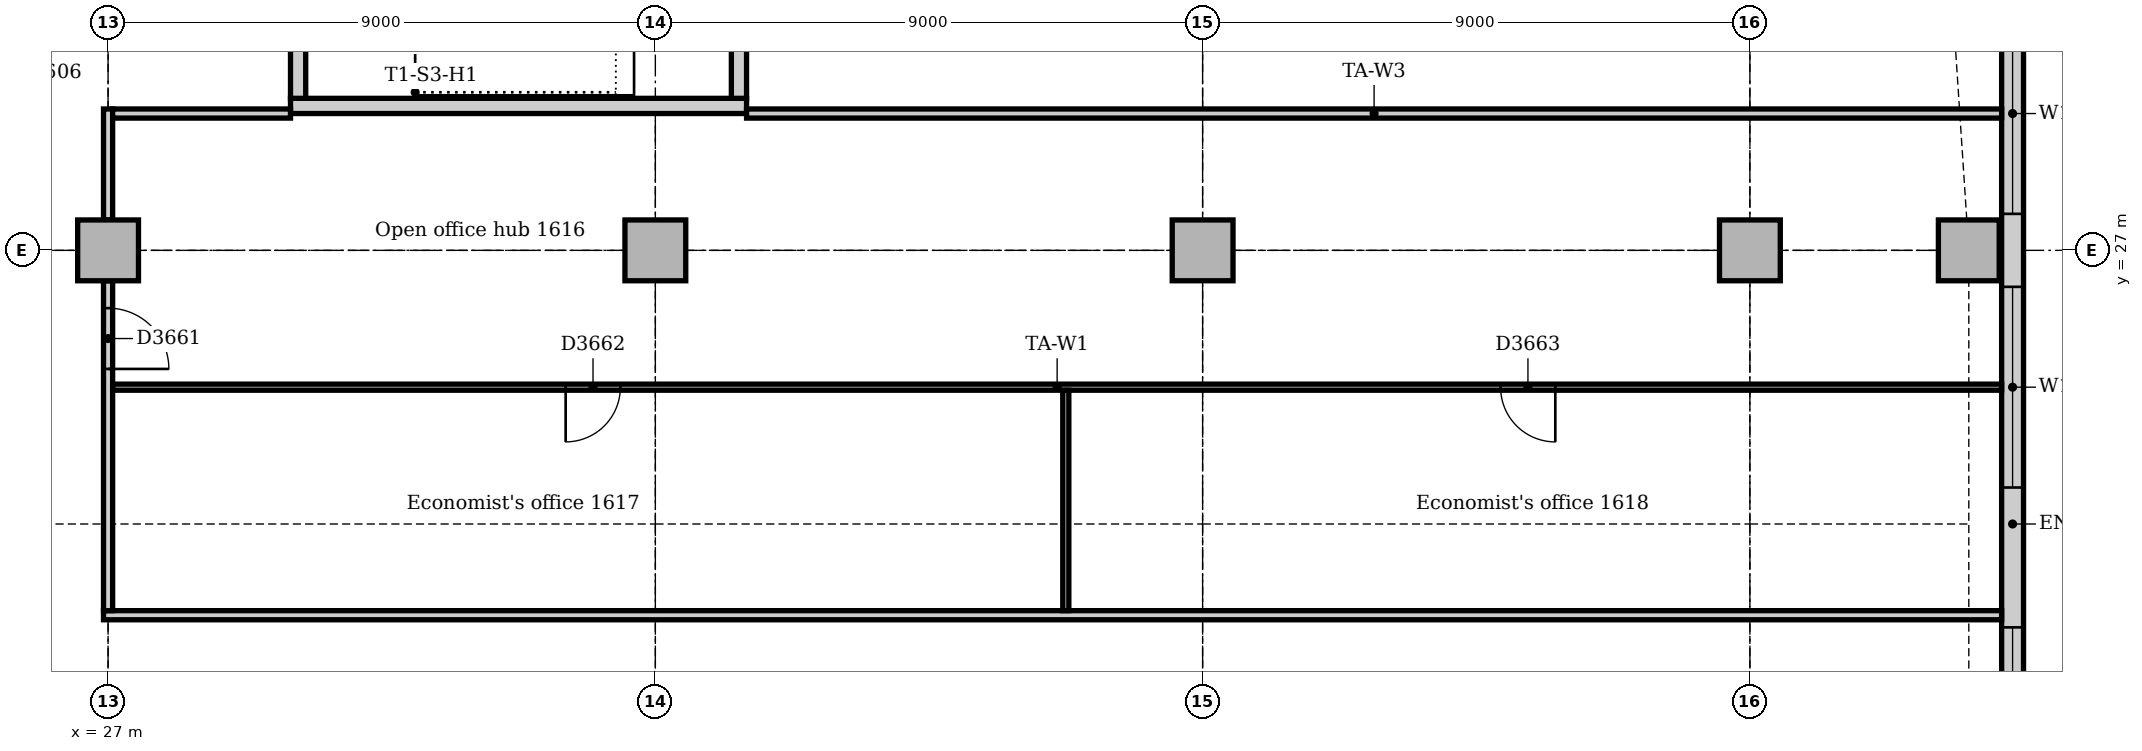
"""IFC4 building model, lengths in metres.
Left out: names, types, materials, properties, quantities, classifications, styles, units other than length and angle.
Written with IfcOpenShell. Run it as: python <this file> out.ifc"""

import sys

from ifc_helpers import new_model, si_unit, direction, frame, frame_2d, origin, origin_2d, place, context, subcontext, project, spatial, rectangle, extrude, element, fill, save


model = new_model("IFC4")
c1 = context("Model", 3, precision=1e-05, world=origin(), true_north=direction((0.0, 1.0)))
c2 = subcontext(c1, "Body", "Model", "MODEL_VIEW")
j1 = project(units=[si_unit("LENGTHUNIT", "METRE"), si_unit("PLANEANGLEUNIT", "RADIAN")], contexts=[c1])
p1 = place(None, origin())
s1 = spatial("IfcSite", under=j1, at=p1, CompositionType="ELEMENT")
p2 = place(p1, origin())
s2 = spatial("IfcBuilding", under=s1, at=p2, CompositionType="ELEMENT")
p3 = place(p2, frame((0.0, 0.0, 71.0)))
s3 = spatial("IfcBuildingStorey", under=s2, at=p3, CompositionType="ELEMENT", Elevation=71.0)
p4 = place(p3, frame((30.0, 29.375, 0.0), z_axis=(0.0, 0.0, 1.0), x_axis=(1.0, 0.0, 0.0)))
e1 = element("IfcWall", 1, at=p4, inside=s3, PredefinedType="SOLIDWALL", context=c2, shape_type="SweptSolid", body=[
    extrude(rectangle(XDim=7.5, YDim=0.25, at=frame_2d((3.75, 0.0))), origin(), (0.0, 0.0, 1.0), 4.0),
])
p5 = place(p3, frame((37.375, 29.5, 0.0), z_axis=(0.0, 0.0, 1.0), x_axis=(0.0, 1.0, 0.0)))
e2 = element("IfcWall", 2, at=p5, inside=s3, PredefinedType="SOLIDWALL", context=c2, shape_type="SweptSolid", body=[
    extrude(rectangle(XDim=4.0, YDim=0.25, at=frame_2d((2.0, 0.0))), origin(), (0.0, 0.0, 1.0), 4.0),
])
p6 = place(p3, frame((30.125, 33.5, 0.0), z_axis=(0.0, 0.0, 1.0), x_axis=(0.0, -1.0, 0.0)))
e3 = element("IfcWall", 3, at=p6, inside=s3, PredefinedType="SOLIDWALL", context=c2, shape_type="SweptSolid", body=[
    extrude(rectangle(XDim=4.0, YDim=0.25, at=frame_2d((2.0, 0.0))), origin(), (0.0, 0.0, 1.0), 4.0),
])
p7 = place(p6, frame((1.5, 0.0, 0.0)))
e4 = element("IfcOpeningElement", 4, at=p7, cuts=e3, PredefinedType="OPENING", context=c2, shape_type="SweptSolid", body=[
    extrude(rectangle(XDim=1.0, YDim=2.1, at=frame_2d((0.5, 1.05))), frame((0.0, 0.135, 0.0), z_axis=(0.0, -1.0, 0.0), x_axis=(1.0, 0.0, 0.0)), (0.0, 0.0, 1.0), 0.27),
])
for number, where, z_axis, x_axis in (
    (5, (57.6, 27.0, 0.0), (0.0, 0.0, 1.0), (1.0, 0.0, 0.0)),
    (6, (27.0, 27.0, 0.0), (0.0, 0.0, 1.0), (1.0, 0.0, 0.0)),
    (7, (36.0, 27.0, 0.0), (0.0, 0.0, 1.0), (1.0, 0.0, 0.0)),
    (8, (45.0, 27.0, 0.0), (0.0, 0.0, 1.0), (1.0, 0.0, 0.0)),
    (9, (54.0, 27.0, 0.0), (0.0, 0.0, 1.0), (1.0, 0.0, 0.0)),
):
    element("IfcColumn", number, at=place(p3, frame(where, z_axis=z_axis, x_axis=x_axis)), inside=s3, PredefinedType="COLUMN", context=c2, shape_type="SweptSolid", body=[
        extrude(rectangle(XDim=1.0, YDim=1.0, at=origin_2d()), origin(), (0.0, 0.0, 1.0), 3.85),
    ])
p8 = place(p3, frame((58.32, 10.243, 0.0), z_axis=(0.0, 0.0, 1.0), x_axis=(0.0, 1.0, 0.0)))
e10 = element("IfcWall", 10, at=p8, inside=s3, PredefinedType="STANDARD", context=c2, shape_type="SweptSolid", body=[
    extrude(rectangle(XDim=24.515, YDim=0.36, at=frame_2d((12.257, 0.0))), origin(), (0.0, 0.0, 1.0), 3.85),
])
p9 = place(p8, frame((4.907, 0.0, 0.9)))
e11 = element("IfcOpeningElement", 11, at=p9, cuts=e10, PredefinedType="OPENING", context=c2, shape_type="SweptSolid", body=[
    extrude(rectangle(XDim=1.8, YDim=1.6, at=frame_2d((0.9, 0.8))), frame((0.0, 0.19, 0.0), z_axis=(0.0, -1.0, 0.0), x_axis=(1.0, 0.0, 0.0)), (0.0, 0.0, 1.0), 0.38),
])
p10 = place(p8, frame((8.757, 0.0, 0.9)))
e12 = element("IfcOpeningElement", 12, at=p10, cuts=e10, PredefinedType="OPENING", context=c2, shape_type="SweptSolid", body=[
    extrude(rectangle(XDim=1.8, YDim=1.6, at=frame_2d((0.9, 0.8))), frame((0.0, 0.19, 0.0), z_axis=(0.0, -1.0, 0.0), x_axis=(1.0, 0.0, 0.0)), (0.0, 0.0, 1.0), 0.38),
])
p11 = place(p8, frame((12.857, 0.0, 0.9)))
e13 = element("IfcOpeningElement", 13, at=p11, cuts=e10, PredefinedType="OPENING", context=c2, shape_type="SweptSolid", body=[
    extrude(rectangle(XDim=3.3, YDim=1.6, at=frame_2d((1.65, 0.8))), frame((0.0, 0.19, 0.0), z_axis=(0.0, -1.0, 0.0), x_axis=(1.0, 0.0, 0.0)), (0.0, 0.0, 1.0), 0.38),
])
p12 = place(p8, frame((17.357, 0.0, 0.9)))
e14 = element("IfcOpeningElement", 14, at=p12, cuts=e10, PredefinedType="OPENING", context=c2, shape_type="SweptSolid", body=[
    extrude(rectangle(XDim=3.3, YDim=1.6, at=frame_2d((1.65, 0.8))), frame((0.0, 0.19, 0.0), z_axis=(0.0, -1.0, 0.0), x_axis=(1.0, 0.0, 0.0)), (0.0, 0.0, 1.0), 0.38),
])
p13 = place(p3, frame((26.925, 21.0, 0.0), z_axis=(0.0, 0.0, 1.0), x_axis=(1.0, 0.0, 0.0)))
e15 = element("IfcWall", 15, at=p13, inside=s3, PredefinedType="PARTITIONING", context=c2, shape_type="SweptSolid", body=[
    extrude(rectangle(XDim=31.215, YDim=0.15, at=frame_2d((15.607, 0.0))), origin(), (0.0, 0.0, 1.0), 3.85),
])
p14 = place(p3, frame((27.0, 21.075, 0.0), z_axis=(0.0, 0.0, 1.0), x_axis=(0.0, 1.0, 0.0)))
e16 = element("IfcWall", 16, at=p14, inside=s3, PredefinedType="PARTITIONING", context=c2, shape_type="SweptSolid", body=[
    extrude(rectangle(XDim=5.425, YDim=0.15, at=frame_2d((2.712, 0.0))), origin(), (0.0, 0.0, 1.0), 3.158),
])
p15 = place(p14, frame((3.975, 0.0, 0.0)))
e17 = element("IfcOpeningElement", 17, at=p15, cuts=e16, PredefinedType="OPENING", context=c2, shape_type="SweptSolid", body=[
    extrude(rectangle(XDim=1.0, YDim=2.1, at=frame_2d((0.5, 1.05))), frame((0.0, 0.085, 0.0), z_axis=(0.0, -1.0, 0.0), x_axis=(1.0, 0.0, 0.0)), (0.0, 0.0, 1.0), 0.17),
])
p16 = place(p3, frame((27.0, 27.5, 0.0), z_axis=(0.0, 0.0, 1.0), x_axis=(0.0, 1.0, 0.0)))
e18 = element("IfcWall", 18, at=p16, inside=s3, PredefinedType="PARTITIONING", context=c2, shape_type="SweptSolid", body=[
    extrude(rectangle(XDim=1.825, YDim=0.15, at=frame_2d((0.912, 0.0))), origin(), (0.0, 0.0, 1.0), 3.158),
])
p17 = place(p3, frame((27.075, 29.25, 0.0), z_axis=(0.0, 0.0, 1.0), x_axis=(1.0, 0.0, 0.0)))
e19 = element("IfcWall", 19, at=p17, inside=s3, PredefinedType="PARTITIONING", context=c2, shape_type="SweptSolid", body=[
    extrude(rectangle(XDim=2.925, YDim=0.15, at=frame_2d((1.462, 0.0))), origin(), (0.0, 0.0, 1.0), 3.85),
])
p18 = place(p3, frame((37.5, 29.25, 0.0), z_axis=(0.0, 0.0, 1.0), x_axis=(1.0, 0.0, 0.0)))
e20 = element("IfcWall", 20, at=p18, inside=s3, PredefinedType="PARTITIONING", context=c2, shape_type="SweptSolid", body=[
    extrude(rectangle(XDim=20.64, YDim=0.15, at=frame_2d((10.32, 0.0))), origin(), (0.0, 0.0, 1.0), 3.85),
])
p19 = place(p3, frame((27.075, 24.75, 0.0), z_axis=(0.0, 0.0, 1.0), x_axis=(1.0, 0.0, 0.0)))
e21 = element("IfcWall", 21, at=p19, inside=s3, PredefinedType="PARTITIONING", context=c2, shape_type="SweptSolid", body=[
    extrude(rectangle(XDim=31.065, YDim=0.1, at=frame_2d((15.533, 0.0))), origin(), (0.0, 0.0, 1.0), 3.85),
])
p20 = place(p19, frame((7.45, 0.0, 0.0)))
e22 = element("IfcOpeningElement", 22, at=p20, cuts=e21, PredefinedType="OPENING", context=c2, shape_type="SweptSolid", body=[
    extrude(rectangle(XDim=0.9, YDim=2.1, at=frame_2d((0.45, 1.05))), frame((0.0, 0.06, 0.0), z_axis=(0.0, -1.0, 0.0), x_axis=(1.0, 0.0, 0.0)), (0.0, 0.0, 1.0), 0.12),
])
p21 = place(p19, frame((22.825, 0.0, 0.0)))
e23 = element("IfcOpeningElement", 23, at=p21, cuts=e21, PredefinedType="OPENING", context=c2, shape_type="SweptSolid", body=[
    extrude(rectangle(XDim=0.9, YDim=2.1, at=frame_2d((0.45, 1.05))), frame((0.0, 0.06, 0.0), z_axis=(0.0, -1.0, 0.0), x_axis=(1.0, 0.0, 0.0)), (0.0, 0.0, 1.0), 0.12),
])
p22 = place(p3, frame((42.75, 21.075, 0.0), z_axis=(0.0, 0.0, 1.0), x_axis=(0.0, 1.0, 0.0)))
e24 = element("IfcWall", 24, at=p22, inside=s3, PredefinedType="PARTITIONING", context=c2, shape_type="SweptSolid", body=[
    extrude(rectangle(XDim=3.625, YDim=0.1, at=frame_2d((1.812, 0.0))), origin(), (0.0, 0.0, 1.0), 3.85),
])
p23 = place(p10, origin())
e25 = element("IfcWindow", 25, at=p23, inside=s3, PartitioningType="SINGLE_PANEL", PredefinedType="WINDOW", context=c2, shape_type="SweptSolid", body=[
    extrude(rectangle(XDim=1.8, YDim=1.6, at=frame_2d((0.9, 0.8))), frame((0.0, 0.13, 0.0), z_axis=(0.0, -1.0, 0.0), x_axis=(1.0, 0.0, 0.0)), (0.0, 0.0, 1.0), 0.06),
])
fill(e12, e25)
p24 = place(p11, origin())
e26 = element("IfcWindow", 26, at=p24, inside=s3, PartitioningType="SINGLE_PANEL", PredefinedType="WINDOW", context=c2, shape_type="SweptSolid", body=[
    extrude(rectangle(XDim=3.3, YDim=1.6, at=frame_2d((1.65, 0.8))), frame((0.0, 0.13, 0.0), z_axis=(0.0, -1.0, 0.0), x_axis=(1.0, 0.0, 0.0)), (0.0, 0.0, 1.0), 0.06),
])
fill(e13, e26)
p25 = place(p12, origin())
e27 = element("IfcWindow", 27, at=p25, inside=s3, PartitioningType="SINGLE_PANEL", PredefinedType="WINDOW", context=c2, shape_type="SweptSolid", body=[
    extrude(rectangle(XDim=3.3, YDim=1.6, at=frame_2d((1.65, 0.8))), frame((0.0, 0.13, 0.0), z_axis=(0.0, -1.0, 0.0), x_axis=(1.0, 0.0, 0.0)), (0.0, 0.0, 1.0), 0.06),
])
fill(e14, e27)
p26 = place(p15, frame((1.0, 0.0, 0.0), z_axis=(0.0, 0.0, 1.0), x_axis=(-1.0, 0.0, 0.0)))
e28 = element("IfcDoor", 28, at=p26, inside=s3, OperationType="SINGLE_SWING_RIGHT", PredefinedType="DOOR", context=c2, shape_type="SweptSolid", body=[
    extrude(rectangle(XDim=1.0, YDim=2.1, at=frame_2d((0.5, 1.05))), frame((0.0, 0.025, 0.0), z_axis=(0.0, -1.0, 0.0), x_axis=(1.0, 0.0, 0.0)), (0.0, 0.0, 1.0), 0.05),
])
fill(e17, e28)
p27 = place(p20, frame((0.9, 0.0, 0.0), z_axis=(0.0, 0.0, 1.0), x_axis=(-1.0, 0.0, 0.0)))
e29 = element("IfcDoor", 29, at=p27, inside=s3, OperationType="SINGLE_SWING_RIGHT", PredefinedType="DOOR", context=c2, shape_type="SweptSolid", body=[
    extrude(rectangle(XDim=0.9, YDim=2.1, at=frame_2d((0.45, 1.05))), frame((0.0, 0.025, 0.0), z_axis=(0.0, -1.0, 0.0), x_axis=(1.0, 0.0, 0.0)), (0.0, 0.0, 1.0), 0.05),
])
fill(e22, e29)
p28 = place(p21, frame((0.9, 0.0, 0.0), z_axis=(0.0, 0.0, 1.0), x_axis=(-1.0, 0.0, 0.0)))
e30 = element("IfcDoor", 30, at=p28, inside=s3, OperationType="SINGLE_SWING_LEFT", PredefinedType="DOOR", context=c2, shape_type="SweptSolid", body=[
    extrude(rectangle(XDim=0.9, YDim=2.1, at=frame_2d((0.45, 1.05))), frame((0.0, 0.025, 0.0), z_axis=(0.0, -1.0, 0.0), x_axis=(1.0, 0.0, 0.0)), (0.0, 0.0, 1.0), 0.05),
])
fill(e23, e30)
save(model, sys.argv[1])
